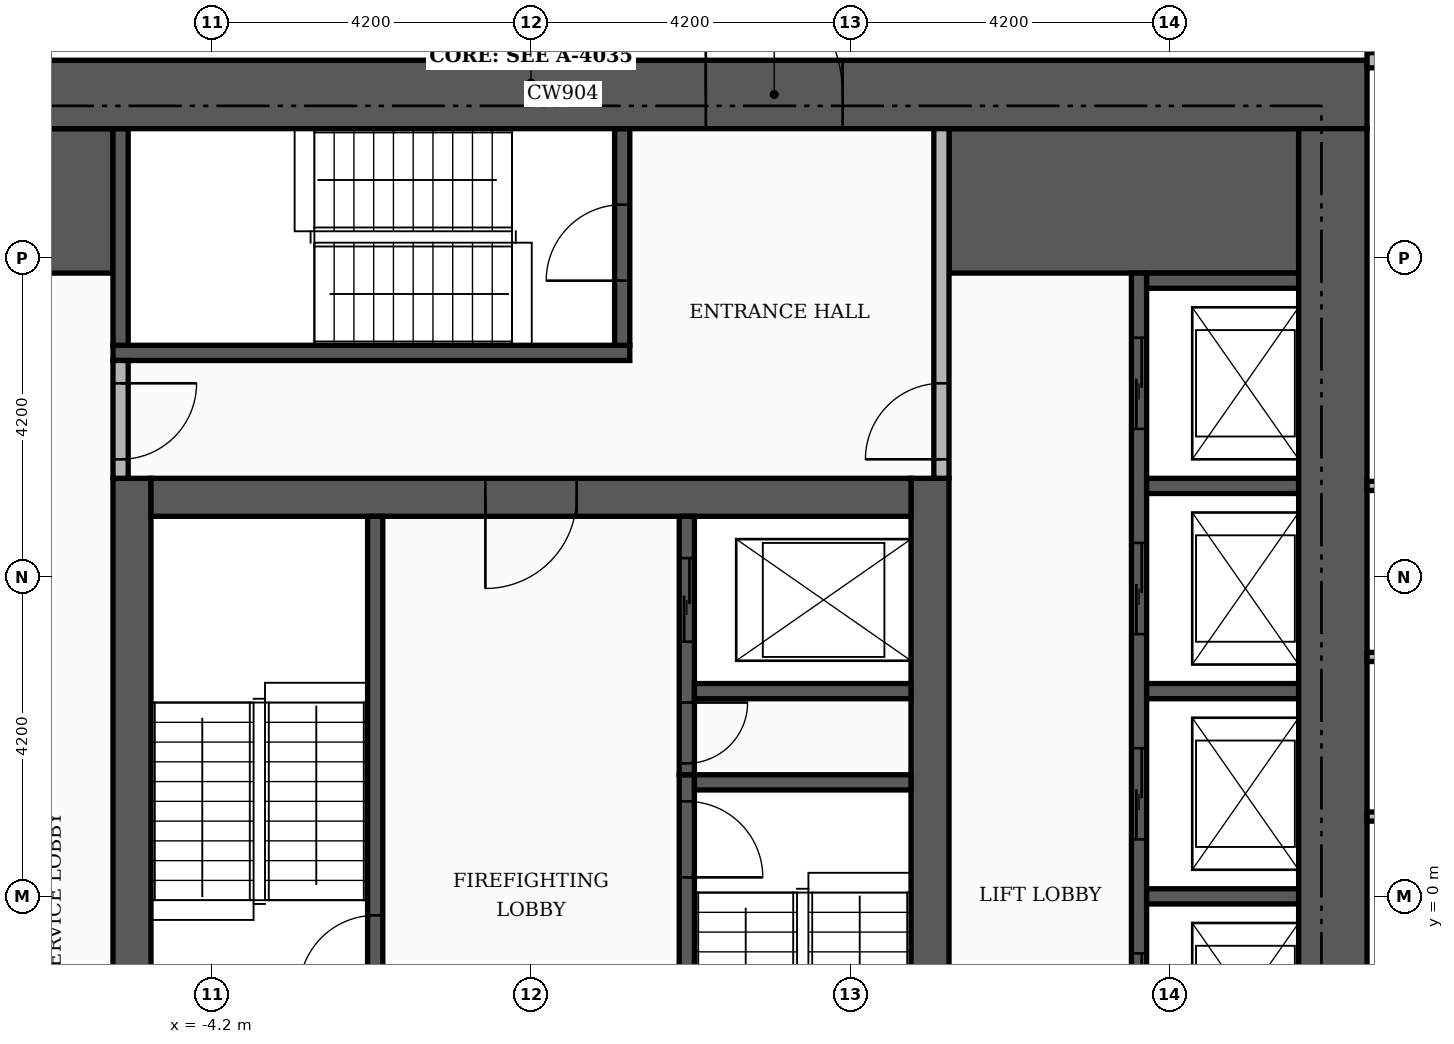
"""IFC4 building model, lengths in metres.
Left out: names, types, materials, properties, quantities, classifications, styles, units other than length and angle.
Written with IfcOpenShell. Run it as: python <this file> out.ifc"""

import sys

from ifc_helpers import new_model, si_unit, direction, frame, frame_2d, origin, place, context, subcontext, project, spatial, rectangle, extrude, element, fill, save


model = new_model("IFC4")
c1 = context("Model", 3, precision=1e-05, world=origin(), true_north=direction((0.0, 1.0)))
c2 = subcontext(c1, "Body", "Model", "MODEL_VIEW")
j1 = project(units=[si_unit("LENGTHUNIT", "METRE"), si_unit("PLANEANGLEUNIT", "RADIAN")], contexts=[c1])
p1 = place(None, origin())
s1 = spatial("IfcSite", under=j1, at=p1, CompositionType="ELEMENT")
p2 = place(p1, origin())
s2 = spatial("IfcBuilding", under=s1, at=p2, CompositionType="ELEMENT")
p3 = place(p2, frame((0.0, 0.0, 207.9)))
s3 = spatial("IfcBuildingStorey", under=s2, at=p3, CompositionType="ELEMENT", Elevation=207.9)
for number, where, z_axis, x_axis in (
    (1, (-5.25, -5.0, 0.0), (0.0, 0.0, 1.0), (0.0, 1.0, 0.0)),
    (2, (5.25, -5.0, 0.0), (0.0, 0.0, 1.0), (0.0, 1.0, 0.0)),
):
    element("IfcWall", number, at=place(p3, frame(where, z_axis=z_axis, x_axis=x_axis)), inside=s3, PredefinedType="SHEAR", context=c2, shape_type="SweptSolid", body=[
        extrude(rectangle(XDim=10.5, YDim=0.5, at=frame_2d((5.25, 0.0))), origin(), (0.0, 0.0, 1.0), 3.48),
    ])
p4 = place(p3, frame((-5.0, 5.25, 0.0), z_axis=(0.0, 0.0, 1.0), x_axis=(1.0, 0.0, 0.0)))
e3 = element("IfcWall", 3, at=p4, inside=s3, PredefinedType="SHEAR", context=c2, shape_type="SweptSolid", body=[
    extrude(rectangle(XDim=10.0, YDim=0.5, at=frame_2d((5.0, 0.0))), origin(), (0.0, 0.0, 1.0), 3.48),
])
p5 = place(p4, frame((4.4, 0.0, 0.0)))
e4 = element("IfcOpeningElement", 4, at=p5, cuts=e3, PredefinedType="OPENING", context=c2, shape_type="SweptSolid", body=[
    extrude(rectangle(XDim=1.2, YDim=2.1, at=frame_2d((0.6, 1.05))), frame((0.0, 0.26, 0.0), z_axis=(0.0, -1.0, 0.0), x_axis=(1.0, 0.0, 0.0)), (0.0, 0.0, 1.0), 0.52),
])
for number, where, z_axis, x_axis in (
    (5, (-10.1, 9.15, 0.0), (0.0, 0.0, 1.0), (1.0, 0.0, 0.0)),
    (6, (5.5, 9.15, 0.0), (0.0, 0.0, 1.0), (1.0, 0.0, 0.0)),
):
    element("IfcWall", number, at=place(p3, frame(where, z_axis=z_axis, x_axis=x_axis)), inside=s3, PredefinedType="SHEAR", context=c2, shape_type="SweptSolid", body=[
        extrude(rectangle(XDim=4.6, YDim=1.9, at=frame_2d((2.3, 0.0))), origin(), (0.0, 0.0, 1.0), 3.48),
    ])
p6 = place(p3, frame((2.05, -5.0, 0.0), z_axis=(0.0, 0.0, 1.0), x_axis=(0.0, 1.0, 0.0)))
e7 = element("IfcWall", 7, at=p6, inside=s3, PredefinedType="SHEAR", context=c2, shape_type="SweptSolid", body=[
    extrude(rectangle(XDim=6.6, YDim=0.2, at=frame_2d((3.3, 0.0))), origin(), (0.0, 0.0, 1.0), 3.48),
])
p7 = place(p6, frame((5.25, 0.0, 0.0)))
e8 = element("IfcOpeningElement", 8, at=p7, cuts=e7, PredefinedType="OPENING", context=c2, shape_type="SweptSolid", body=[
    extrude(rectangle(XDim=1.0, YDim=2.1, at=frame_2d((0.5, 1.05))), frame((0.0, 0.11, 0.0), z_axis=(0.0, -1.0, 0.0), x_axis=(1.0, 0.0, 0.0)), (0.0, 0.0, 1.0), 0.22),
])
p8 = place(p3, frame((-2.05, -1.4, 0.0), z_axis=(0.0, 0.0, 1.0), x_axis=(0.0, 1.0, 0.0)))
e9 = element("IfcWall", 9, at=p8, inside=s3, PredefinedType="SHEAR", context=c2, shape_type="SweptSolid", body=[
    extrude(rectangle(XDim=6.4, YDim=0.2, at=frame_2d((3.2, 0.0))), origin(), (0.0, 0.0, 1.0), 3.48),
])
p9 = place(p8, frame((0.15, 0.0, 0.0)))
e10 = element("IfcOpeningElement", 10, at=p9, cuts=e9, PredefinedType="OPENING", context=c2, shape_type="SweptSolid", body=[
    extrude(rectangle(XDim=1.0, YDim=2.1, at=frame_2d((0.5, 1.05))), frame((0.0, 0.11, 0.0), z_axis=(0.0, -1.0, 0.0), x_axis=(1.0, 0.0, 0.0)), (0.0, 0.0, 1.0), 0.22),
])
p10 = place(p3, frame((2.15, 1.5, 0.0), z_axis=(0.0, 0.0, 1.0), x_axis=(1.0, 0.0, 0.0)))
e11 = element("IfcWall", 11, at=p10, inside=s3, PredefinedType="SHEAR", context=c2, shape_type="SweptSolid", body=[
    extrude(rectangle(XDim=2.85, YDim=0.2, at=frame_2d((1.425, 0.0))), origin(), (0.0, 0.0, 1.0), 3.48),
])
p11 = place(p3, frame((-5.5, 7.15, 0.0), z_axis=(0.0, 0.0, 1.0), x_axis=(1.0, 0.0, 0.0)))
e12 = element("IfcWall", 12, at=p11, inside=s3, PredefinedType="SHEAR", context=c2, shape_type="SweptSolid", body=[
    extrude(rectangle(XDim=6.8, YDim=0.2, at=frame_2d((3.4, 0.0))), origin(), (0.0, 0.0, 1.0), 3.48),
])
p12 = place(p3, frame((-5.4, 7.25, 0.0), z_axis=(0.0, 0.0, 1.0), x_axis=(0.0, 1.0, 0.0)))
e13 = element("IfcWall", 13, at=p12, inside=s3, PredefinedType="SHEAR", context=c2, shape_type="SweptSolid", body=[
    extrude(rectangle(XDim=2.85, YDim=0.2, at=frame_2d((1.425, 0.0))), origin(), (0.0, 0.0, 1.0), 3.48),
])
p13 = place(p3, frame((1.2, 7.25, 0.0), z_axis=(0.0, 0.0, 1.0), x_axis=(0.0, 1.0, 0.0)))
e14 = element("IfcWall", 14, at=p13, inside=s3, PredefinedType="SHEAR", context=c2, shape_type="SweptSolid", body=[
    extrude(rectangle(XDim=2.85, YDim=0.2, at=frame_2d((1.425, 0.0))), origin(), (0.0, 0.0, 1.0), 3.48),
])
p14 = place(p13, frame((0.85, 0.0, 0.0)))
e15 = element("IfcOpeningElement", 15, at=p14, cuts=e14, PredefinedType="OPENING", context=c2, shape_type="SweptSolid", body=[
    extrude(rectangle(XDim=1.0, YDim=2.1, at=frame_2d((0.5, 1.05))), frame((0.0, 0.11, 0.0), z_axis=(0.0, -1.0, 0.0), x_axis=(1.0, 0.0, 0.0)), (0.0, 0.0, 1.0), 0.22),
])
p15 = place(p3, frame((8.0, -8.2, 0.0), z_axis=(0.0, 0.0, 1.0), x_axis=(0.0, 1.0, 0.0)))
e16 = element("IfcWall", 16, at=p15, inside=s3, PredefinedType="SHEAR", context=c2, shape_type="SweptSolid", body=[
    extrude(rectangle(XDim=16.4, YDim=0.2, at=frame_2d((8.2, 0.0))), origin(), (0.0, 0.0, 1.0), 3.48),
])
p16 = place(p15, frame((0.85, 0.0, 0.0)))
e17 = element("IfcOpeningElement", 17, at=p16, cuts=e16, PredefinedType="OPENING", context=c2, shape_type="SweptSolid", body=[
    extrude(rectangle(XDim=1.2, YDim=2.1, at=frame_2d((0.6, 1.05))), frame((0.0, 0.11, 0.0), z_axis=(0.0, -1.0, 0.0), x_axis=(1.0, 0.0, 0.0)), (0.0, 0.0, 1.0), 0.22),
])
p17 = place(p15, frame((3.55, 0.0, 0.0)))
e18 = element("IfcOpeningElement", 18, at=p17, cuts=e16, PredefinedType="OPENING", context=c2, shape_type="SweptSolid", body=[
    extrude(rectangle(XDim=1.2, YDim=2.1, at=frame_2d((0.6, 1.05))), frame((0.0, 0.11, 0.0), z_axis=(0.0, -1.0, 0.0), x_axis=(1.0, 0.0, 0.0)), (0.0, 0.0, 1.0), 0.22),
])
p18 = place(p15, frame((6.25, 0.0, 0.0)))
e19 = element("IfcOpeningElement", 19, at=p18, cuts=e16, PredefinedType="OPENING", context=c2, shape_type="SweptSolid", body=[
    extrude(rectangle(XDim=1.2, YDim=2.1, at=frame_2d((0.6, 1.05))), frame((0.0, 0.11, 0.0), z_axis=(0.0, -1.0, 0.0), x_axis=(1.0, 0.0, 0.0)), (0.0, 0.0, 1.0), 0.22),
])
p19 = place(p15, frame((8.95, 0.0, 0.0)))
e20 = element("IfcOpeningElement", 20, at=p19, cuts=e16, PredefinedType="OPENING", context=c2, shape_type="SweptSolid", body=[
    extrude(rectangle(XDim=1.2, YDim=2.1, at=frame_2d((0.6, 1.05))), frame((0.0, 0.11, 0.0), z_axis=(0.0, -1.0, 0.0), x_axis=(1.0, 0.0, 0.0)), (0.0, 0.0, 1.0), 0.22),
])
p20 = place(p15, frame((11.65, 0.0, 0.0)))
e21 = element("IfcOpeningElement", 21, at=p20, cuts=e16, PredefinedType="OPENING", context=c2, shape_type="SweptSolid", body=[
    extrude(rectangle(XDim=1.2, YDim=2.1, at=frame_2d((0.6, 1.05))), frame((0.0, 0.11, 0.0), z_axis=(0.0, -1.0, 0.0), x_axis=(1.0, 0.0, 0.0)), (0.0, 0.0, 1.0), 0.22),
])
p21 = place(p15, frame((14.35, 0.0, 0.0)))
e22 = element("IfcOpeningElement", 22, at=p21, cuts=e16, PredefinedType="OPENING", context=c2, shape_type="SweptSolid", body=[
    extrude(rectangle(XDim=1.2, YDim=2.1, at=frame_2d((0.6, 1.05))), frame((0.0, 0.11, 0.0), z_axis=(0.0, -1.0, 0.0), x_axis=(1.0, 0.0, 0.0)), (0.0, 0.0, 1.0), 0.22),
])
p22 = place(p3, frame((8.1, 0.0, 0.0), z_axis=(0.0, 0.0, 1.0), x_axis=(1.0, 0.0, 0.0)))
e23 = element("IfcWall", 23, at=p22, inside=s3, PredefinedType="SHEAR", context=c2, shape_type="SweptSolid", body=[
    extrude(rectangle(XDim=2.0, YDim=0.2, at=frame_2d((1.0, 0.0))), origin(), (0.0, 0.0, 1.0), 3.48),
])
p23 = place(p3, frame((2.05, 1.6, 0.0), z_axis=(0.0, 0.0, 1.0), x_axis=(0.0, 1.0, 0.0)))
e24 = element("IfcWall", 24, at=p23, inside=s3, PredefinedType="SHEAR", context=c2, shape_type="SweptSolid", body=[
    extrude(rectangle(XDim=3.4, YDim=0.2, at=frame_2d((1.7, 0.0))), origin(), (0.0, 0.0, 1.0), 3.48),
])
p24 = place(p23, frame((1.75, 0.0, 0.0)))
e25 = element("IfcOpeningElement", 25, at=p24, cuts=e24, PredefinedType="OPENING", context=c2, shape_type="SweptSolid", body=[
    extrude(rectangle(XDim=1.1, YDim=2.1, at=frame_2d((0.55, 1.05))), frame((0.0, 0.11, 0.0), z_axis=(0.0, -1.0, 0.0), x_axis=(1.0, 0.0, 0.0)), (0.0, 0.0, 1.0), 0.22),
])
p25 = place(p23, frame((0.15, 0.0, 0.0)))
e26 = element("IfcOpeningElement", 26, at=p25, cuts=e24, PredefinedType="OPENING", context=c2, shape_type="SweptSolid", body=[
    extrude(rectangle(XDim=0.8, YDim=2.1, at=frame_2d((0.4, 1.05))), frame((0.0, 0.11, 0.0), z_axis=(0.0, -1.0, 0.0), x_axis=(1.0, 0.0, 0.0)), (0.0, 0.0, 1.0), 0.22),
])
p26 = place(p3, frame((2.15, 2.7, 0.0), z_axis=(0.0, 0.0, 1.0), x_axis=(1.0, 0.0, 0.0)))
e27 = element("IfcWall", 27, at=p26, inside=s3, PredefinedType="SHEAR", context=c2, shape_type="SweptSolid", body=[
    extrude(rectangle(XDim=2.85, YDim=0.2, at=frame_2d((1.425, 0.0))), origin(), (0.0, 0.0, 1.0), 3.48),
])
for number, where, z_axis, x_axis in (
    (28, (8.1, 2.7, 0.0), (0.0, 0.0, 1.0), (1.0, 0.0, 0.0)),
    (29, (8.1, 5.4, 0.0), (0.0, 0.0, 1.0), (1.0, 0.0, 0.0)),
    (30, (8.1, 8.1, 0.0), (0.0, 0.0, 1.0), (1.0, 0.0, 0.0)),
):
    element("IfcWall", number, at=place(p3, frame(where, z_axis=z_axis, x_axis=x_axis)), inside=s3, PredefinedType="SHEAR", context=c2, shape_type="SweptSolid", body=[
        extrude(rectangle(XDim=2.0, YDim=0.2, at=frame_2d((1.0, 0.0))), origin(), (0.0, 0.0, 1.0), 3.48),
    ])
p27 = place(p3, frame((-11.0, 10.55, 0.0), z_axis=(0.0, 0.0, 1.0), x_axis=(1.0, 0.0, 0.0)))
e31 = element("IfcWall", 31, at=p27, inside=s3, PredefinedType="SHEAR", context=c2, shape_type="SweptSolid", body=[
    extrude(rectangle(XDim=22.0, YDim=0.9, at=frame_2d((11.0, 0.0))), origin(), (0.0, 0.0, 1.0), 3.48),
])
p28 = place(p27, frame((13.3, 0.0, 0.0)))
e32 = element("IfcOpeningElement", 32, at=p28, cuts=e31, PredefinedType="OPENING", context=c2, shape_type="SweptSolid", body=[
    extrude(rectangle(XDim=1.8, YDim=2.2, at=frame_2d((0.9, 1.1))), frame((0.0, 0.46, 0.0), z_axis=(0.0, -1.0, 0.0), x_axis=(1.0, 0.0, 0.0)), (0.0, 0.0, 1.0), 0.92),
])
p29 = place(p3, frame((10.55, -10.1, 0.0), z_axis=(0.0, 0.0, 1.0), x_axis=(0.0, 1.0, 0.0)))
e33 = element("IfcWall", 33, at=p29, inside=s3, PredefinedType="SHEAR", context=c2, shape_type="SweptSolid", body=[
    extrude(rectangle(XDim=20.2, YDim=0.9, at=frame_2d((10.1, 0.0))), origin(), (0.0, 0.0, 1.0), 3.48),
])
p30 = place(p3, frame((-5.4, 5.5, 0.0), z_axis=(0.0, 0.0, 1.0), x_axis=(0.0, 1.0, 0.0)))
e34 = element("IfcWall", 34, at=p30, inside=s3, PredefinedType="PARTITIONING", context=c2, shape_type="SweptSolid", body=[
    extrude(rectangle(XDim=1.55, YDim=0.2, at=frame_2d((0.775, 0.0))), origin(), (0.0, 0.0, 1.0), 3.48),
])
p31 = place(p30, frame((0.25, 0.0, 0.0)))
e35 = element("IfcOpeningElement", 35, at=p31, cuts=e34, PredefinedType="OPENING", context=c2, shape_type="SweptSolid", body=[
    extrude(rectangle(XDim=1.0, YDim=2.1, at=frame_2d((0.5, 1.05))), frame((0.0, 0.11, 0.0), z_axis=(0.0, -1.0, 0.0), x_axis=(1.0, 0.0, 0.0)), (0.0, 0.0, 1.0), 0.22),
])
p32 = place(p3, frame((5.4, 5.5, 0.0), z_axis=(0.0, 0.0, 1.0), x_axis=(0.0, 1.0, 0.0)))
e36 = element("IfcWall", 36, at=p32, inside=s3, PredefinedType="PARTITIONING", context=c2, shape_type="SweptSolid", body=[
    extrude(rectangle(XDim=4.6, YDim=0.2, at=frame_2d((2.3, 0.0))), origin(), (0.0, 0.0, 1.0), 3.48),
])
p33 = place(p32, frame((0.25, 0.0, 0.0)))
e37 = element("IfcOpeningElement", 37, at=p33, cuts=e36, PredefinedType="OPENING", context=c2, shape_type="SweptSolid", body=[
    extrude(rectangle(XDim=1.0, YDim=2.1, at=frame_2d((0.5, 1.05))), frame((0.0, 0.11, 0.0), z_axis=(0.0, -1.0, 0.0), x_axis=(1.0, 0.0, 0.0)), (0.0, 0.0, 1.0), 0.22),
])
for number, where, z_axis, x_axis in (
    (38, (11.0, 1.05, 0.0), (0.0, 0.0, 1.0), (1.0, 0.0, 0.0)),
    (39, (11.0, 3.15, 0.0), (0.0, 0.0, 1.0), (1.0, 0.0, 0.0)),
    (40, (11.0, 5.4, 0.0), (0.0, 0.0, 1.0), (1.0, 0.0, 0.0)),
):
    element("IfcWall", number, at=place(p3, frame(where, z_axis=z_axis, x_axis=x_axis)), inside=s3, PredefinedType="PARTITIONING", context=c2, shape_type="SweptSolid", body=[
        extrude(rectangle(XDim=7.32, YDim=0.12, at=frame_2d((3.66, 0.0))), origin(), (0.0, 0.0, 1.0), 3.48),
    ])
p34 = place(p3, frame((11.0, 11.0, 0.0), z_axis=(0.0, 0.0, 1.0), x_axis=(1.0, 0.0, 0.0)))
e41 = element("IfcWall", 41, at=p34, inside=s3, PredefinedType="PARTITIONING", context=c2, shape_type="SweptSolid", body=[
    extrude(rectangle(XDim=2.65, YDim=0.2, at=frame_2d((1.325, 0.0))), origin(), (0.0, 0.0, 1.0), 3.48),
])
p35 = place(p18, origin())
e42 = element("IfcDoor", 42, at=p35, inside=s3, OperationType="SLIDING_TO_LEFT", PredefinedType="DOOR", context=c2, shape_type="SweptSolid", body=[
    extrude(rectangle(XDim=1.2, YDim=2.1, at=frame_2d((0.6, 1.05))), frame((0.0, 0.025, 0.0), z_axis=(0.0, -1.0, 0.0), x_axis=(1.0, 0.0, 0.0)), (0.0, 0.0, 1.0), 0.05),
])
fill(e19, e42)
p36 = place(p19, origin())
e43 = element("IfcDoor", 43, at=p36, inside=s3, OperationType="SLIDING_TO_LEFT", PredefinedType="DOOR", context=c2, shape_type="SweptSolid", body=[
    extrude(rectangle(XDim=1.2, YDim=2.1, at=frame_2d((0.6, 1.05))), frame((0.0, 0.025, 0.0), z_axis=(0.0, -1.0, 0.0), x_axis=(1.0, 0.0, 0.0)), (0.0, 0.0, 1.0), 0.05),
])
fill(e20, e43)
p37 = place(p20, origin())
e44 = element("IfcDoor", 44, at=p37, inside=s3, OperationType="SLIDING_TO_LEFT", PredefinedType="DOOR", context=c2, shape_type="SweptSolid", body=[
    extrude(rectangle(XDim=1.2, YDim=2.1, at=frame_2d((0.6, 1.05))), frame((0.0, 0.025, 0.0), z_axis=(0.0, -1.0, 0.0), x_axis=(1.0, 0.0, 0.0)), (0.0, 0.0, 1.0), 0.05),
])
fill(e21, e44)
p38 = place(p21, origin())
e45 = element("IfcDoor", 45, at=p38, inside=s3, OperationType="SLIDING_TO_LEFT", PredefinedType="DOOR", context=c2, shape_type="SweptSolid", body=[
    extrude(rectangle(XDim=1.2, YDim=2.1, at=frame_2d((0.6, 1.05))), frame((0.0, 0.025, 0.0), z_axis=(0.0, -1.0, 0.0), x_axis=(1.0, 0.0, 0.0)), (0.0, 0.0, 1.0), 0.05),
])
fill(e22, e45)
p39 = place(p24, origin())
e46 = element("IfcDoor", 46, at=p39, inside=s3, OperationType="SLIDING_TO_LEFT", PredefinedType="DOOR", context=c2, shape_type="SweptSolid", body=[
    extrude(rectangle(XDim=1.1, YDim=2.1, at=frame_2d((0.55, 1.05))), frame((0.0, 0.025, 0.0), z_axis=(0.0, -1.0, 0.0), x_axis=(1.0, 0.0, 0.0)), (0.0, 0.0, 1.0), 0.05),
])
fill(e25, e46)
p40 = place(p9, origin())
e47 = element("IfcDoor", 47, at=p40, inside=s3, OperationType="SINGLE_SWING_LEFT", PredefinedType="DOOR", context=c2, shape_type="SweptSolid", body=[
    extrude(rectangle(XDim=1.0, YDim=2.1, at=frame_2d((0.5, 1.05))), frame((0.0, 0.025, 0.0), z_axis=(0.0, -1.0, 0.0), x_axis=(1.0, 0.0, 0.0)), (0.0, 0.0, 1.0), 0.05),
])
fill(e10, e47)
p41 = place(p7, frame((1.0, 0.0, 0.0), z_axis=(0.0, 0.0, 1.0), x_axis=(-1.0, 0.0, 0.0)))
e48 = element("IfcDoor", 48, at=p41, inside=s3, OperationType="SINGLE_SWING_LEFT", PredefinedType="DOOR", context=c2, shape_type="SweptSolid", body=[
    extrude(rectangle(XDim=1.0, YDim=2.1, at=frame_2d((0.5, 1.05))), frame((0.0, 0.025, 0.0), z_axis=(0.0, -1.0, 0.0), x_axis=(1.0, 0.0, 0.0)), (0.0, 0.0, 1.0), 0.05),
])
fill(e8, e48)
p42 = place(p25, frame((0.8, 0.0, 0.0), z_axis=(0.0, 0.0, 1.0), x_axis=(-1.0, 0.0, 0.0)))
e49 = element("IfcDoor", 49, at=p42, inside=s3, OperationType="SINGLE_SWING_RIGHT", PredefinedType="DOOR", context=c2, shape_type="SweptSolid", body=[
    extrude(rectangle(XDim=0.8, YDim=2.1, at=frame_2d((0.4, 1.05))), frame((0.0, 0.025, 0.0), z_axis=(0.0, -1.0, 0.0), x_axis=(1.0, 0.0, 0.0)), (0.0, 0.0, 1.0), 0.05),
])
fill(e26, e49)
p43 = place(p5, frame((1.2, 0.0, 0.0), z_axis=(0.0, 0.0, 1.0), x_axis=(-1.0, 0.0, 0.0)))
e50 = element("IfcDoor", 50, at=p43, inside=s3, OperationType="SINGLE_SWING_LEFT", PredefinedType="DOOR", context=c2, shape_type="SweptSolid", body=[
    extrude(rectangle(XDim=1.2, YDim=2.1, at=frame_2d((0.6, 1.05))), frame((0.0, 0.025, 0.0), z_axis=(0.0, -1.0, 0.0), x_axis=(1.0, 0.0, 0.0)), (0.0, 0.0, 1.0), 0.05),
])
fill(e4, e50)
p44 = place(p14, origin())
e51 = element("IfcDoor", 51, at=p44, inside=s3, OperationType="SINGLE_SWING_LEFT", PredefinedType="DOOR", context=c2, shape_type="SweptSolid", body=[
    extrude(rectangle(XDim=1.0, YDim=2.1, at=frame_2d((0.5, 1.05))), frame((0.0, 0.025, 0.0), z_axis=(0.0, -1.0, 0.0), x_axis=(1.0, 0.0, 0.0)), (0.0, 0.0, 1.0), 0.05),
])
fill(e15, e51)
p45 = place(p31, frame((1.0, 0.0, 0.0), z_axis=(0.0, 0.0, 1.0), x_axis=(-1.0, 0.0, 0.0)))
e52 = element("IfcDoor", 52, at=p45, inside=s3, OperationType="SINGLE_SWING_RIGHT", PredefinedType="DOOR", context=c2, shape_type="SweptSolid", body=[
    extrude(rectangle(XDim=1.0, YDim=2.1, at=frame_2d((0.5, 1.05))), frame((0.0, 0.025, 0.0), z_axis=(0.0, -1.0, 0.0), x_axis=(1.0, 0.0, 0.0)), (0.0, 0.0, 1.0), 0.05),
])
fill(e35, e52)
p46 = place(p33, origin())
e53 = element("IfcDoor", 53, at=p46, inside=s3, OperationType="SINGLE_SWING_LEFT", PredefinedType="DOOR", context=c2, shape_type="SweptSolid", body=[
    extrude(rectangle(XDim=1.0, YDim=2.1, at=frame_2d((0.5, 1.05))), frame((0.0, 0.025, 0.0), z_axis=(0.0, -1.0, 0.0), x_axis=(1.0, 0.0, 0.0)), (0.0, 0.0, 1.0), 0.05),
])
fill(e37, e53)
p47 = place(p28, origin())
e54 = element("IfcDoor", 54, at=p47, inside=s3, OperationType="DOUBLE_DOOR_SINGLE_SWING", PredefinedType="DOOR", context=c2, shape_type="SweptSolid", body=[
    extrude(rectangle(XDim=1.8, YDim=2.2, at=frame_2d((0.9, 1.1))), frame((0.0, 0.025, 0.0), z_axis=(0.0, -1.0, 0.0), x_axis=(1.0, 0.0, 0.0)), (0.0, 0.0, 1.0), 0.05),
])
fill(e32, e54)
save(model, sys.argv[1])
